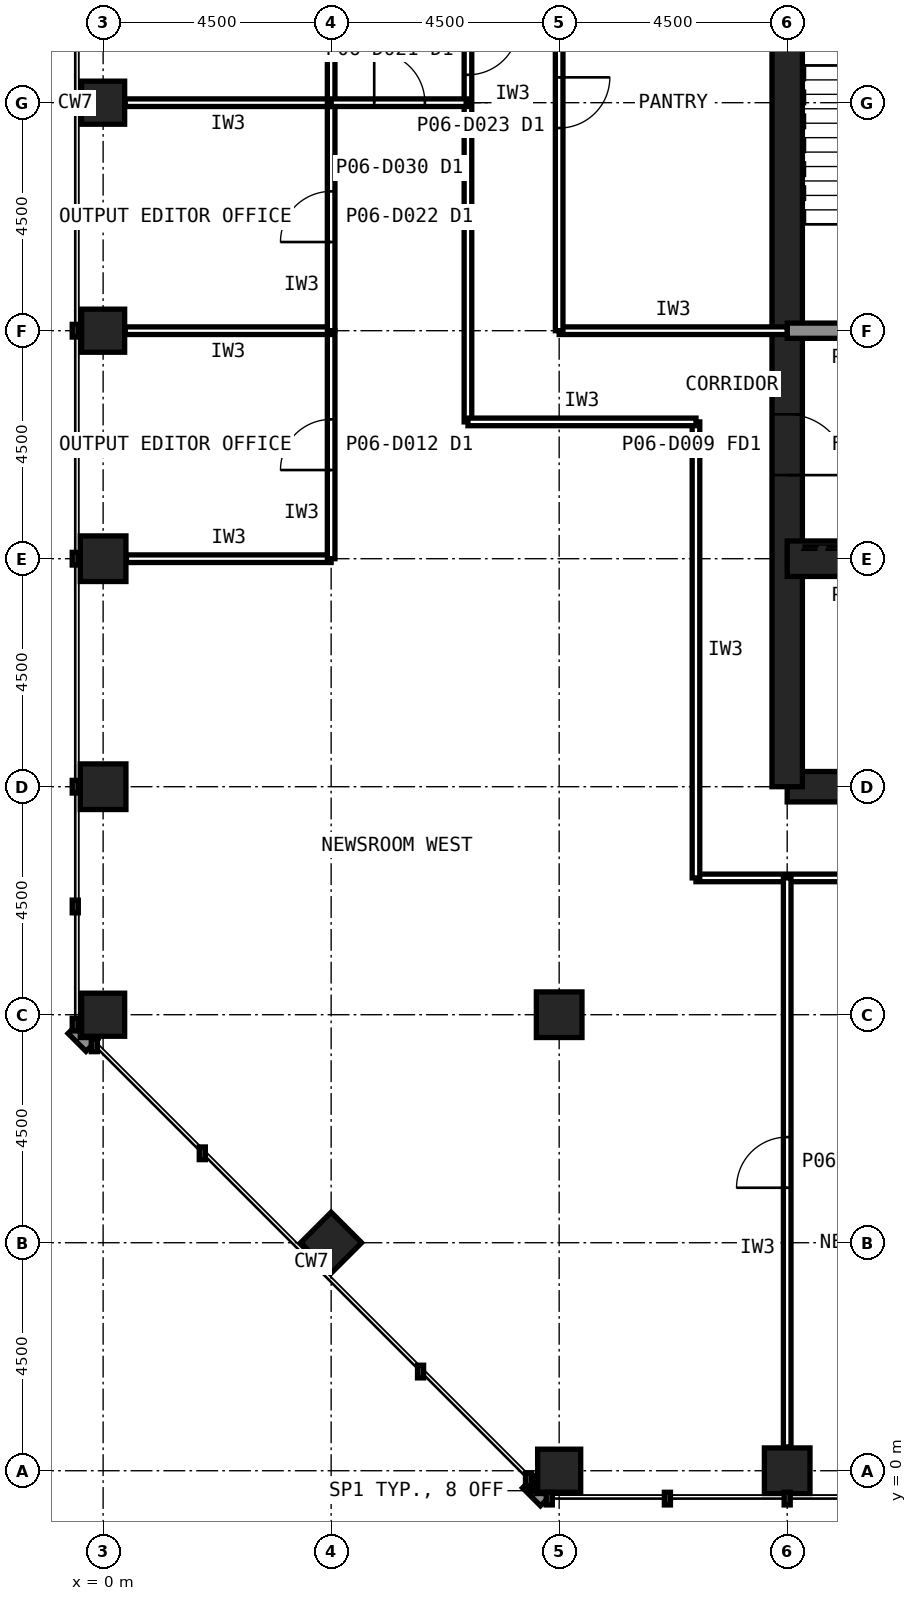
"""IFC4 building model, lengths in metres.
Left out: names, types, materials, properties, quantities, classifications, styles, units other than length and angle.
Written with IfcOpenShell. Run it as: python <this file> out.ifc"""

import sys

from ifc_helpers import new_model, si_unit, direction, frame, frame_2d, origin, origin_2d, place, context, subcontext, project, spatial, rectangle, hollow_rectangle, extrude, element, fill, save


model = new_model("IFC4")
c1 = context("Model", 3, precision=1e-05, world=origin(), true_north=direction((0.0, 1.0)))
c2 = subcontext(c1, "Body", "Model", "MODEL_VIEW")
j1 = project(units=[si_unit("LENGTHUNIT", "METRE"), si_unit("PLANEANGLEUNIT", "RADIAN")], contexts=[c1])
p1 = place(None, origin())
s1 = spatial("IfcSite", under=j1, at=p1, CompositionType="ELEMENT")
p2 = place(p1, origin())
s2 = spatial("IfcBuilding", under=s1, at=p2, CompositionType="ELEMENT")
p3 = place(p2, frame((0.0, 0.0, 29.0)))
s3 = spatial("IfcBuildingStorey", under=s2, at=p3, CompositionType="ELEMENT", Elevation=29.0)
p4 = place(p3, frame((9.0, 0.0, 0.0), z_axis=(0.0, 0.0, 1.0), x_axis=(1.0, 0.0, 0.0)))
e1 = element("IfcColumn", 1, at=p4, inside=s3, PredefinedType="COLUMN", context=c2, shape_type="SweptSolid", body=[
    extrude(hollow_rectangle(XDim=0.85, YDim=0.85, WallThickness=0.05, at=origin_2d()), origin(), (0.0, 0.0, 1.0), 4.2),
])
p5 = place(p3, frame((13.5, 0.0, 0.0), z_axis=(0.0, 0.0, 1.0), x_axis=(1.0, 0.0, 0.0)))
e2 = element("IfcColumn", 2, at=p5, inside=s3, PredefinedType="COLUMN", context=c2, shape_type="SweptSolid", body=[
    extrude(hollow_rectangle(XDim=0.9, YDim=0.9, WallThickness=0.063, at=origin_2d()), origin(), (0.0, 0.0, 1.0), 4.2),
])
for number, where, z_axis, x_axis in (
    (3, (0.0, 27.0, 0.0), (0.0, 0.0, 1.0), (1.0, 0.0, 0.0)),
    (4, (0.0, 22.5, 0.0), (0.0, 0.0, 1.0), (1.0, 0.0, 0.0)),
):
    element("IfcColumn", number, at=place(p3, frame(where, z_axis=z_axis, x_axis=x_axis)), inside=s3, PredefinedType="COLUMN", context=c2, shape_type="SweptSolid", body=[
        extrude(hollow_rectangle(XDim=0.85, YDim=0.85, WallThickness=0.05, at=origin_2d()), origin(), (0.0, 0.0, 1.0), 4.2),
    ])
for number, where, z_axis, x_axis in (
    (5, (0.0, 18.0, 0.0), (0.0, 0.0, 1.0), (1.0, 0.0, 0.0)),
    (6, (0.0, 13.5, 0.0), (0.0, 0.0, 1.0), (1.0, 0.0, 0.0)),
):
    element("IfcColumn", number, at=place(p3, frame(where, z_axis=z_axis, x_axis=x_axis)), inside=s3, PredefinedType="COLUMN", context=c2, shape_type="SweptSolid", body=[
        extrude(hollow_rectangle(XDim=0.9, YDim=0.9, WallThickness=0.063, at=origin_2d()), origin(), (0.0, 0.0, 1.0), 4.2),
    ])
for number, where, z_axis, x_axis in (
    (7, (0.0, 9.0, 0.0), (0.0, 0.0, 1.0), (1.0, 0.0, 0.0)),
    (8, (4.5, 4.5, 0.0), (0.0, 0.0, 1.0), (0.707, 0.707, 0.0)),
):
    element("IfcColumn", number, at=place(p3, frame(where, z_axis=z_axis, x_axis=x_axis)), inside=s3, PredefinedType="COLUMN", context=c2, shape_type="SweptSolid", body=[
        extrude(hollow_rectangle(XDim=0.85, YDim=0.85, WallThickness=0.05, at=origin_2d()), origin(), (0.0, 0.0, 1.0), 4.2),
    ])
p6 = place(p3, frame((9.0, 9.0, 0.0), z_axis=(0.0, 0.0, 1.0), x_axis=(1.0, 0.0, 0.0)))
e9 = element("IfcColumn", 9, at=p6, inside=s3, PredefinedType="COLUMN", context=c2, shape_type="SweptSolid", body=[
    extrude(hollow_rectangle(XDim=0.9, YDim=0.9, WallThickness=0.063, at=origin_2d()), origin(), (0.0, 0.0, 1.0), 4.2),
])
p7 = place(p3, frame((13.5, 13.5, 0.0), z_axis=(0.0, 0.0, 1.0), x_axis=(1.0, 0.0, 0.0)))
e10 = element("IfcWall", 10, at=p7, inside=s3, PredefinedType="SHEAR", context=c2, shape_type="SweptSolid", body=[
    extrude(rectangle(XDim=27.0, YDim=0.6, at=frame_2d((13.5, 0.0))), origin(), (0.0, 0.0, 1.0), 4.2),
])
p8 = place(p3, frame((13.5, 40.5, 0.0), z_axis=(0.0, 0.0, 1.0), x_axis=(0.0, -1.0, 0.0)))
e11 = element("IfcWall", 11, at=p8, inside=s3, PredefinedType="SHEAR", context=c2, shape_type="SweptSolid", body=[
    extrude(rectangle(XDim=27.0, YDim=0.6, at=frame_2d((13.5, 0.0))), origin(), (0.0, 0.0, 1.0), 4.2),
])
p9 = place(p8, frame((19.65, 0.0, 0.0)))
e12 = element("IfcOpeningElement", 12, at=p9, cuts=e11, PredefinedType="OPENING", context=c2, shape_type="SweptSolid", body=[
    extrude(rectangle(XDim=1.2, YDim=2.1, at=frame_2d((0.6, 1.05))), frame((0.0, 0.31, 0.0), z_axis=(0.0, -1.0, 0.0), x_axis=(1.0, 0.0, 0.0)), (0.0, 0.0, 1.0), 0.62),
])
p10 = place(p8, frame((5.85, 0.0, 0.0)))
e13 = element("IfcOpeningElement", 13, at=p10, cuts=e11, PredefinedType="OPENING", context=c2, shape_type="SweptSolid", body=[
    extrude(rectangle(XDim=1.8, YDim=2.1, at=frame_2d((0.9, 1.05))), frame((0.0, 0.31, 0.0), z_axis=(0.0, -1.0, 0.0), x_axis=(1.0, 0.0, 0.0)), (0.0, 0.0, 1.0), 0.62),
])
p11 = place(p3, frame((13.5, 18.0, 0.0), z_axis=(0.0, 0.0, 1.0), x_axis=(1.0, 0.0, 0.0)))
e14 = element("IfcWall", 14, at=p11, inside=s3, PredefinedType="SHEAR", context=c2, shape_type="SweptSolid", body=[
    extrude(rectangle(XDim=27.0, YDim=0.7, at=frame_2d((13.5, 0.0))), origin(), (0.0, 0.0, 1.0), 4.2),
])
p12 = place(p11, frame((24.3, 0.0, 0.0)))
e15 = element("IfcOpeningElement", 15, at=p12, cuts=e14, PredefinedType="OPENING", context=c2, shape_type="SweptSolid", body=[
    extrude(rectangle(XDim=0.9, YDim=2.1, at=frame_2d((0.45, 1.05))), frame((0.0, 0.36, 0.0), z_axis=(0.0, -1.0, 0.0), x_axis=(1.0, 0.0, 0.0)), (0.0, 0.0, 1.0), 0.72),
])
p13 = place(p11, frame((5.45, 0.0, 0.0)))
e16 = element("IfcOpeningElement", 16, at=p13, cuts=e14, PredefinedType="OPENING", context=c2, shape_type="SweptSolid", body=[
    extrude(rectangle(XDim=1.1, YDim=2.1, at=frame_2d((0.55, 1.05))), frame((0.0, 0.36, 0.0), z_axis=(0.0, -1.0, 0.0), x_axis=(1.0, 0.0, 0.0)), (0.0, 0.0, 1.0), 0.72),
])
p14 = place(p11, frame((8.45, 0.0, 0.0)))
e17 = element("IfcOpeningElement", 17, at=p14, cuts=e14, PredefinedType="OPENING", context=c2, shape_type="SweptSolid", body=[
    extrude(rectangle(XDim=1.1, YDim=2.1, at=frame_2d((0.55, 1.05))), frame((0.0, 0.36, 0.0), z_axis=(0.0, -1.0, 0.0), x_axis=(1.0, 0.0, 0.0)), (0.0, 0.0, 1.0), 0.72),
])
p15 = place(p11, frame((11.45, 0.0, 0.0)))
e18 = element("IfcOpeningElement", 18, at=p15, cuts=e14, PredefinedType="OPENING", context=c2, shape_type="SweptSolid", body=[
    extrude(rectangle(XDim=1.1, YDim=2.1, at=frame_2d((0.55, 1.05))), frame((0.0, 0.36, 0.0), z_axis=(0.0, -1.0, 0.0), x_axis=(1.0, 0.0, 0.0)), (0.0, 0.0, 1.0), 0.72),
])
p16 = place(p11, frame((14.45, 0.0, 0.0)))
e19 = element("IfcOpeningElement", 19, at=p16, cuts=e14, PredefinedType="OPENING", context=c2, shape_type="SweptSolid", body=[
    extrude(rectangle(XDim=1.1, YDim=2.1, at=frame_2d((0.55, 1.05))), frame((0.0, 0.36, 0.0), z_axis=(0.0, -1.0, 0.0), x_axis=(1.0, 0.0, 0.0)), (0.0, 0.0, 1.0), 0.72),
])
p17 = place(p11, frame((17.45, 0.0, 0.0)))
e20 = element("IfcOpeningElement", 20, at=p17, cuts=e14, PredefinedType="OPENING", context=c2, shape_type="SweptSolid", body=[
    extrude(rectangle(XDim=1.1, YDim=2.1, at=frame_2d((0.55, 1.05))), frame((0.0, 0.36, 0.0), z_axis=(0.0, -1.0, 0.0), x_axis=(1.0, 0.0, 0.0)), (0.0, 0.0, 1.0), 0.72),
])
p18 = place(p11, frame((20.45, 0.0, 0.0)))
e21 = element("IfcOpeningElement", 21, at=p18, cuts=e14, PredefinedType="OPENING", context=c2, shape_type="SweptSolid", body=[
    extrude(rectangle(XDim=1.1, YDim=2.1, at=frame_2d((0.55, 1.05))), frame((0.0, 0.36, 0.0), z_axis=(0.0, -1.0, 0.0), x_axis=(1.0, 0.0, 0.0)), (0.0, 0.0, 1.0), 0.72),
])
p19 = place(p11, frame((1.6, 0.0, 0.0)))
e22 = element("IfcOpeningElement", 22, at=p19, cuts=e14, PredefinedType="OPENING", context=c2, shape_type="SweptSolid", body=[
    extrude(rectangle(XDim=1.3, YDim=2.2, at=frame_2d((0.65, 1.1))), frame((0.0, 0.36, 0.0), z_axis=(0.0, -1.0, 0.0), x_axis=(1.0, 0.0, 0.0)), (0.0, 0.0, 1.0), 0.72),
])
p20 = place(p3, frame((13.5, 22.5, 0.0), z_axis=(0.0, 0.0, 1.0), x_axis=(1.0, 0.0, 0.0)))
e23 = element("IfcWall", 23, at=p20, inside=s3, PredefinedType="SOLIDWALL", context=c2, shape_type="SweptSolid", body=[
    extrude(rectangle(XDim=27.0, YDim=0.3, at=frame_2d((13.5, 0.0))), origin(), (0.0, 0.0, 1.0), 4.04),
])
p21 = place(p20, frame((1.65, 0.0, 0.0)))
e24 = element("IfcOpeningElement", 24, at=p21, cuts=e23, PredefinedType="OPENING", context=c2, shape_type="SweptSolid", body=[
    extrude(rectangle(XDim=1.2, YDim=2.1, at=frame_2d((0.6, 1.05))), frame((0.0, 0.16, 0.0), z_axis=(0.0, -1.0, 0.0), x_axis=(1.0, 0.0, 0.0)), (0.0, 0.0, 1.0), 0.32),
])
p22 = place(p20, frame((6.025, 0.0, 0.0)))
e25 = element("IfcOpeningElement", 25, at=p22, cuts=e23, PredefinedType="OPENING", context=c2, shape_type="SweptSolid", body=[
    extrude(rectangle(XDim=1.0, YDim=2.1, at=frame_2d((0.5, 1.05))), frame((0.0, 0.16, 0.0), z_axis=(0.0, -1.0, 0.0), x_axis=(1.0, 0.0, 0.0)), (0.0, 0.0, 1.0), 0.32),
])
p23 = place(p20, frame((10.525, 0.0, 0.0)))
e26 = element("IfcOpeningElement", 26, at=p23, cuts=e23, PredefinedType="OPENING", context=c2, shape_type="SweptSolid", body=[
    extrude(rectangle(XDim=1.0, YDim=2.1, at=frame_2d((0.5, 1.05))), frame((0.0, 0.16, 0.0), z_axis=(0.0, -1.0, 0.0), x_axis=(1.0, 0.0, 0.0)), (0.0, 0.0, 1.0), 0.32),
])
p24 = place(p20, frame((19.75, 0.0, 0.0)))
e27 = element("IfcOpeningElement", 27, at=p24, cuts=e23, PredefinedType="OPENING", context=c2, shape_type="SweptSolid", body=[
    extrude(rectangle(XDim=1.0, YDim=2.1, at=frame_2d((0.5, 1.05))), frame((0.0, 0.16, 0.0), z_axis=(0.0, -1.0, 0.0), x_axis=(1.0, 0.0, 0.0)), (0.0, 0.0, 1.0), 0.32),
])
p25 = place(p20, frame((15.05, 0.0, 0.0)))
e28 = element("IfcOpeningElement", 28, at=p25, cuts=e23, PredefinedType="OPENING", context=c2, shape_type="SweptSolid", body=[
    extrude(rectangle(XDim=1.4, YDim=2.4, at=frame_2d((0.7, 1.2))), frame((0.0, 0.16, 0.0), z_axis=(0.0, -1.0, 0.0), x_axis=(1.0, 0.0, 0.0)), (0.0, 0.0, 1.0), 0.32),
])
p26 = place(p3, frame((11.7, 11.7, 0.0), z_axis=(0.0, 0.0, 1.0), x_axis=(1.0, 0.0, 0.0)))
e29 = element("IfcWall", 29, at=p26, inside=s3, PredefinedType="PARTITIONING", context=c2, shape_type="SweptSolid", body=[
    extrude(rectangle(XDim=30.6, YDim=0.15, at=frame_2d((15.3, 0.0))), origin(), (0.0, 0.0, 1.0), 4.04),
])
p27 = place(p26, frame((14.8, 0.0, 0.0)))
e30 = element("IfcOpeningElement", 30, at=p27, cuts=e29, PredefinedType="OPENING", context=c2, shape_type="SweptSolid", body=[
    extrude(rectangle(XDim=1.0, YDim=2.1, at=frame_2d((0.5, 1.05))), frame((0.0, 0.085, 0.0), z_axis=(0.0, -1.0, 0.0), x_axis=(1.0, 0.0, 0.0)), (0.0, 0.0, 1.0), 0.17),
])
p28 = place(p3, frame((7.2, 33.3, 0.0), z_axis=(0.0, 0.0, 1.0), x_axis=(0.0, -1.0, 0.0)))
e31 = element("IfcWall", 31, at=p28, inside=s3, PredefinedType="PARTITIONING", context=c2, shape_type="SweptSolid", body=[
    extrude(rectangle(XDim=12.6, YDim=0.15, at=frame_2d((6.3, 0.0))), origin(), (0.0, 0.0, 1.0), 4.04),
])
p29 = place(p28, frame((4.75, 0.0, 0.0)))
e32 = element("IfcOpeningElement", 32, at=p29, cuts=e31, PredefinedType="OPENING", context=c2, shape_type="SweptSolid", body=[
    extrude(rectangle(XDim=1.0, YDim=2.1, at=frame_2d((0.5, 1.05))), frame((0.0, 0.085, 0.0), z_axis=(0.0, -1.0, 0.0), x_axis=(1.0, 0.0, 0.0)), (0.0, 0.0, 1.0), 0.17),
])
p30 = place(p3, frame((11.7, 20.7, 0.0), z_axis=(0.0, 0.0, 1.0), x_axis=(0.0, -1.0, 0.0)))
e33 = element("IfcWall", 33, at=p30, inside=s3, PredefinedType="PARTITIONING", context=c2, shape_type="SweptSolid", body=[
    extrude(rectangle(XDim=9.0, YDim=0.15, at=frame_2d((4.5, 0.0))), origin(), (0.0, 0.0, 1.0), 4.04),
])
p31 = place(p3, frame((7.2, 20.7, 0.0), z_axis=(0.0, 0.0, 1.0), x_axis=(1.0, 0.0, 0.0)))
e34 = element("IfcWall", 34, at=p31, inside=s3, PredefinedType="PARTITIONING", context=c2, shape_type="SweptSolid", body=[
    extrude(rectangle(XDim=4.5, YDim=0.15, at=frame_2d((2.25, 0.0))), origin(), (0.0, 0.0, 1.0), 4.04),
])
p32 = place(p3, frame((0.46, 18.0, 0.0), z_axis=(0.0, 0.0, 1.0), x_axis=(1.0, 0.0, 0.0)))
e35 = element("IfcWall", 35, at=p32, inside=s3, PredefinedType="PARTITIONING", context=c2, shape_type="SweptSolid", body=[
    extrude(rectangle(XDim=4.04, YDim=0.15, at=frame_2d((2.02, 0.0))), origin(), (0.0, 0.0, 1.0), 3.189),
])
p33 = place(p3, frame((4.5, 18.0, 0.0), z_axis=(0.0, 0.0, 1.0), x_axis=(0.0, 1.0, 0.0)))
e36 = element("IfcWall", 36, at=p33, inside=s3, PredefinedType="PARTITIONING", context=c2, shape_type="SweptSolid", body=[
    extrude(rectangle(XDim=4.5, YDim=0.15, at=frame_2d((2.25, 0.0))), origin(), (0.0, 0.0, 1.0), 4.04),
])
p34 = place(p33, frame((1.75, 0.0, 0.0)))
e37 = element("IfcOpeningElement", 37, at=p34, cuts=e36, PredefinedType="OPENING", context=c2, shape_type="SweptSolid", body=[
    extrude(rectangle(XDim=1.0, YDim=2.1, at=frame_2d((0.5, 1.05))), frame((0.0, 0.085, 0.0), z_axis=(0.0, -1.0, 0.0), x_axis=(1.0, 0.0, 0.0)), (0.0, 0.0, 1.0), 0.17),
])
p35 = place(p3, frame((4.5, 22.5, 0.0), z_axis=(0.0, 0.0, 1.0), x_axis=(-1.0, 0.0, 0.0)))
e38 = element("IfcWall", 38, at=p35, inside=s3, PredefinedType="PARTITIONING", context=c2, shape_type="SweptSolid", body=[
    extrude(rectangle(XDim=4.065, YDim=0.15, at=frame_2d((2.032, 0.0))), origin(), (0.0, 0.0, 1.0), 3.189),
])
p36 = place(p3, frame((4.5, 22.5, 0.0), z_axis=(0.0, 0.0, 1.0), x_axis=(0.0, 1.0, 0.0)))
e39 = element("IfcWall", 39, at=p36, inside=s3, PredefinedType="PARTITIONING", context=c2, shape_type="SweptSolid", body=[
    extrude(rectangle(XDim=4.5, YDim=0.15, at=frame_2d((2.25, 0.0))), origin(), (0.0, 0.0, 1.0), 4.04),
])
p37 = place(p36, frame((1.75, 0.0, 0.0)))
e40 = element("IfcOpeningElement", 40, at=p37, cuts=e39, PredefinedType="OPENING", context=c2, shape_type="SweptSolid", body=[
    extrude(rectangle(XDim=1.0, YDim=2.1, at=frame_2d((0.5, 1.05))), frame((0.0, 0.085, 0.0), z_axis=(0.0, -1.0, 0.0), x_axis=(1.0, 0.0, 0.0)), (0.0, 0.0, 1.0), 0.17),
])
p38 = place(p3, frame((4.5, 27.0, 0.0), z_axis=(0.0, 0.0, 1.0), x_axis=(-1.0, 0.0, 0.0)))
e41 = element("IfcWall", 41, at=p38, inside=s3, PredefinedType="PARTITIONING", context=c2, shape_type="SweptSolid", body=[
    extrude(rectangle(XDim=4.065, YDim=0.15, at=frame_2d((2.032, 0.0))), origin(), (0.0, 0.0, 1.0), 3.189),
])
p39 = place(p3, frame((4.5, 27.0, 0.0), z_axis=(0.0, 0.0, 1.0), x_axis=(0.0, 1.0, 0.0)))
e42 = element("IfcWall", 42, at=p39, inside=s3, PredefinedType="PARTITIONING", context=c2, shape_type="SweptSolid", body=[
    extrude(rectangle(XDim=9.0, YDim=0.15, at=frame_2d((4.5, 0.0))), origin(), (0.0, 0.0, 1.0), 4.04),
])
p40 = place(p39, frame((4.0, 0.0, 0.0)))
e43 = element("IfcOpeningElement", 43, at=p40, cuts=e42, PredefinedType="OPENING", context=c2, shape_type="SweptSolid", body=[
    extrude(rectangle(XDim=1.0, YDim=2.1, at=frame_2d((0.5, 1.05))), frame((0.0, 0.085, 0.0), z_axis=(0.0, -1.0, 0.0), x_axis=(1.0, 0.0, 0.0)), (0.0, 0.0, 1.0), 0.17),
])
p41 = place(p3, frame((9.0, 22.5, 0.0), z_axis=(0.0, 0.0, 1.0), x_axis=(1.0, 0.0, 0.0)))
e44 = element("IfcWall", 44, at=p41, inside=s3, PredefinedType="PARTITIONING", context=c2, shape_type="SweptSolid", body=[
    extrude(rectangle(XDim=4.5, YDim=0.15, at=frame_2d((2.25, 0.0))), origin(), (0.0, 0.0, 1.0), 3.189),
])
p42 = place(p3, frame((9.0, 31.5, 0.0), z_axis=(0.0, 0.0, 1.0), x_axis=(0.0, -1.0, 0.0)))
e45 = element("IfcWall", 45, at=p42, inside=s3, PredefinedType="PARTITIONING", context=c2, shape_type="SweptSolid", body=[
    extrude(rectangle(XDim=9.0, YDim=0.15, at=frame_2d((4.5, 0.0))), origin(), (0.0, 0.0, 1.0), 4.04),
])
p43 = place(p42, frame((4.0, 0.0, 0.0)))
e46 = element("IfcOpeningElement", 46, at=p43, cuts=e45, PredefinedType="OPENING", context=c2, shape_type="SweptSolid", body=[
    extrude(rectangle(XDim=1.0, YDim=2.1, at=frame_2d((0.5, 1.05))), frame((0.0, 0.085, 0.0), z_axis=(0.0, -1.0, 0.0), x_axis=(1.0, 0.0, 0.0)), (0.0, 0.0, 1.0), 0.17),
])
p44 = place(p3, frame((13.5, 0.47, 0.0), z_axis=(0.0, 0.0, 1.0), x_axis=(0.0, 1.0, 0.0)))
e47 = element("IfcWall", 47, at=p44, inside=s3, PredefinedType="PARTITIONING", context=c2, shape_type="SweptSolid", body=[
    extrude(rectangle(XDim=11.23, YDim=0.15, at=frame_2d((5.615, 0.0))), origin(), (0.0, 0.0, 1.0), 3.189),
])
p45 = place(p44, frame((5.115, 0.0, 0.0)))
e48 = element("IfcOpeningElement", 48, at=p45, cuts=e47, PredefinedType="OPENING", context=c2, shape_type="SweptSolid", body=[
    extrude(rectangle(XDim=1.0, YDim=2.1, at=frame_2d((0.5, 1.05))), frame((0.0, 0.085, 0.0), z_axis=(0.0, -1.0, 0.0), x_axis=(1.0, 0.0, 0.0)), (0.0, 0.0, 1.0), 0.17),
])
p46 = place(p3, frame((4.5, 27.0, 0.0), z_axis=(0.0, 0.0, 1.0), x_axis=(1.0, 0.0, 0.0)))
e49 = element("IfcWall", 49, at=p46, inside=s3, PredefinedType="PARTITIONING", context=c2, shape_type="SweptSolid", body=[
    extrude(rectangle(XDim=2.7, YDim=0.15, at=frame_2d((1.35, 0.0))), origin(), (0.0, 0.0, 1.0), 3.189),
])
p47 = place(p46, frame((0.85, 0.0, 0.0)))
e50 = element("IfcOpeningElement", 50, at=p47, cuts=e49, PredefinedType="OPENING", context=c2, shape_type="SweptSolid", body=[
    extrude(rectangle(XDim=1.0, YDim=2.1, at=frame_2d((0.5, 1.05))), frame((0.0, 0.085, 0.0), z_axis=(0.0, -1.0, 0.0), x_axis=(1.0, 0.0, 0.0)), (0.0, 0.0, 1.0), 0.17),
])
p48 = place(p9, origin())
e51 = element("IfcDoor", 51, at=p48, inside=s3, OperationType="SINGLE_SWING_RIGHT", PredefinedType="DOOR", context=c2, shape_type="SweptSolid", body=[
    extrude(rectangle(XDim=1.2, YDim=2.1, at=frame_2d((0.6, 1.05))), frame((0.0, 0.025, 0.0), z_axis=(0.0, -1.0, 0.0), x_axis=(1.0, 0.0, 0.0)), (0.0, 0.0, 1.0), 0.05),
])
fill(e12, e51)
p49 = place(p29, origin())
e52 = element("IfcDoor", 52, at=p49, inside=s3, OperationType="SINGLE_SWING_LEFT", PredefinedType="DOOR", context=c2, shape_type="SweptSolid", body=[
    extrude(rectangle(XDim=1.0, YDim=2.1, at=frame_2d((0.5, 1.05))), frame((0.0, 0.025, 0.0), z_axis=(0.0, -1.0, 0.0), x_axis=(1.0, 0.0, 0.0)), (0.0, 0.0, 1.0), 0.05),
])
fill(e32, e52)
p50 = place(p34, origin())
e53 = element("IfcDoor", 53, at=p50, inside=s3, OperationType="SINGLE_SWING_LEFT", PredefinedType="DOOR", context=c2, shape_type="SweptSolid", body=[
    extrude(rectangle(XDim=1.0, YDim=2.1, at=frame_2d((0.5, 1.05))), frame((0.0, 0.025, 0.0), z_axis=(0.0, -1.0, 0.0), x_axis=(1.0, 0.0, 0.0)), (0.0, 0.0, 1.0), 0.05),
])
fill(e37, e53)
p51 = place(p37, origin())
e54 = element("IfcDoor", 54, at=p51, inside=s3, OperationType="SINGLE_SWING_LEFT", PredefinedType="DOOR", context=c2, shape_type="SweptSolid", body=[
    extrude(rectangle(XDim=1.0, YDim=2.1, at=frame_2d((0.5, 1.05))), frame((0.0, 0.025, 0.0), z_axis=(0.0, -1.0, 0.0), x_axis=(1.0, 0.0, 0.0)), (0.0, 0.0, 1.0), 0.05),
])
fill(e40, e54)
p52 = place(p43, origin())
e55 = element("IfcDoor", 55, at=p52, inside=s3, OperationType="SINGLE_SWING_LEFT", PredefinedType="DOOR", context=c2, shape_type="SweptSolid", body=[
    extrude(rectangle(XDim=1.0, YDim=2.1, at=frame_2d((0.5, 1.05))), frame((0.0, 0.025, 0.0), z_axis=(0.0, -1.0, 0.0), x_axis=(1.0, 0.0, 0.0)), (0.0, 0.0, 1.0), 0.05),
])
fill(e46, e55)
p53 = place(p45, origin())
e56 = element("IfcDoor", 56, at=p53, inside=s3, OperationType="SINGLE_SWING_LEFT", PredefinedType="DOOR", context=c2, shape_type="SweptSolid", body=[
    extrude(rectangle(XDim=1.0, YDim=2.1, at=frame_2d((0.5, 1.05))), frame((0.0, 0.025, 0.0), z_axis=(0.0, -1.0, 0.0), x_axis=(1.0, 0.0, 0.0)), (0.0, 0.0, 1.0), 0.05),
])
fill(e48, e56)
p54 = place(p47, origin())
e57 = element("IfcDoor", 57, at=p54, inside=s3, OperationType="SINGLE_SWING_LEFT", PredefinedType="DOOR", context=c2, shape_type="SweptSolid", body=[
    extrude(rectangle(XDim=1.0, YDim=2.1, at=frame_2d((0.5, 1.05))), frame((0.0, 0.025, 0.0), z_axis=(0.0, -1.0, 0.0), x_axis=(1.0, 0.0, 0.0)), (0.0, 0.0, 1.0), 0.05),
])
fill(e50, e57)
save(model, sys.argv[1])
